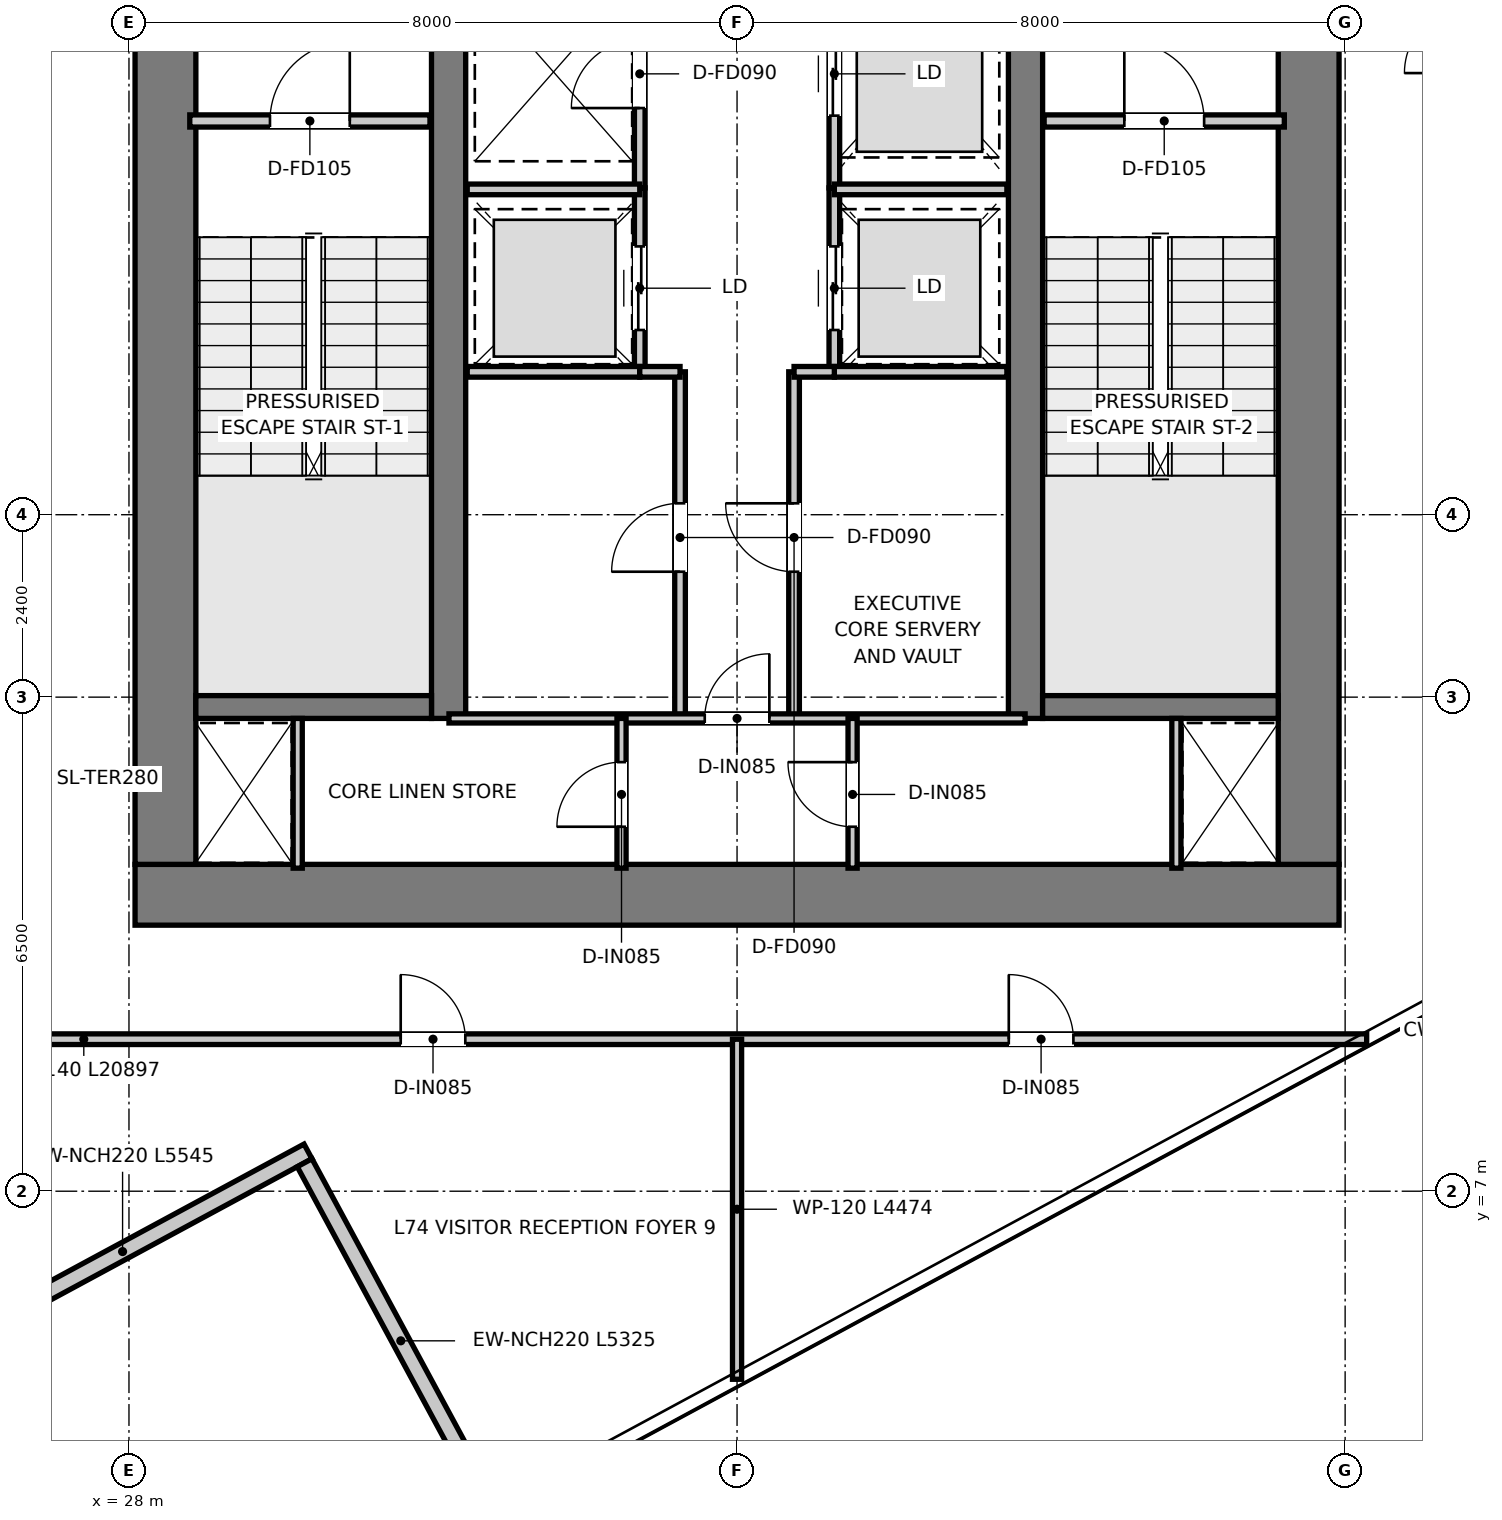
"""IFC4 building model, lengths in metres.
Left out: names, types, materials, properties, quantities, classifications, styles, units other than length and angle.
Written with IfcOpenShell. Run it as: python <this file> out.ifc"""

import sys

from ifc_helpers import new_model, si_unit, direction, frame, frame_2d, origin, place, context, subcontext, project, spatial, rectangle, extrude, element, fill, save


model = new_model("IFC4")
c1 = context("Model", 3, precision=1e-05, world=origin(), true_north=direction((0.0, 1.0)))
c2 = subcontext(c1, "Body", "Model", "MODEL_VIEW")
j1 = project(units=[si_unit("LENGTHUNIT", "METRE"), si_unit("PLANEANGLEUNIT", "RADIAN")], contexts=[c1])
p1 = place(None, origin())
s1 = spatial("IfcSite", under=j1, at=p1, CompositionType="ELEMENT")
p2 = place(p1, origin())
s2 = spatial("IfcBuilding", under=s1, at=p2, CompositionType="ELEMENT")
p3 = place(p2, frame((0.0, 0.0, 302.95)))
s3 = spatial("IfcBuildingStorey", under=s2, at=p3, CompositionType="ELEMENT", Elevation=302.95)
p4 = place(p3, frame((28.08, 10.9, 0.0), z_axis=(0.0, 0.0, 1.0), x_axis=(1.0, 0.0, 0.0)))
e1 = element("IfcWall", 1, at=p4, inside=s3, PredefinedType="SHEAR", context=c2, shape_type="SweptSolid", body=[
    extrude(rectangle(XDim=15.84, YDim=0.8, at=frame_2d((7.92, 0.0))), origin(), (0.0, 0.0, 1.0), 3.95),
])
for number, where, z_axis, x_axis in (
    (2, (28.48, 11.3, 0.0), (0.0, 0.0, 1.0), (0.0, 1.0, 0.0)),
    (3, (43.52, 11.3, 0.0), (0.0, 0.0, 1.0), (0.0, 1.0, 0.0)),
):
    element("IfcWall", number, at=place(p3, frame(where, z_axis=z_axis, x_axis=x_axis)), inside=s3, PredefinedType="SHEAR", context=c2, shape_type="SweptSolid", body=[
        extrude(rectangle(XDim=14.7, YDim=0.8, at=frame_2d((7.35, 0.0))), origin(), (0.0, 0.0, 1.0), 3.95),
    ])
p5 = place(p3, frame((32.205, 13.22, 0.0), z_axis=(0.0, 0.0, 1.0), x_axis=(0.0, 1.0, 0.0)))
e4 = element("IfcWall", 4, at=p5, inside=s3, PredefinedType="SHEAR", context=c2, shape_type="SweptSolid", body=[
    extrude(rectangle(XDim=12.78, YDim=0.45, at=frame_2d((6.39, 0.0))), origin(), (0.0, 0.0, 1.0), 3.95),
])
p6 = place(p5, frame((10.58, 0.0, 0.0)))
e5 = element("IfcOpeningElement", 5, at=p6, cuts=e4, PredefinedType="OPENING", context=c2, shape_type="SweptSolid", body=[
    extrude(rectangle(XDim=1.1, YDim=2.15, at=frame_2d((0.55, 1.075))), frame((0.0, 0.235, 0.0), z_axis=(0.0, -1.0, 0.0), x_axis=(1.0, 0.0, 0.0)), (0.0, 0.0, 1.0), 0.47),
])
p7 = place(p3, frame((39.795, 13.22, 0.0), z_axis=(0.0, 0.0, 1.0), x_axis=(0.0, 1.0, 0.0)))
e6 = element("IfcWall", 6, at=p7, inside=s3, PredefinedType="SHEAR", context=c2, shape_type="SweptSolid", body=[
    extrude(rectangle(XDim=12.78, YDim=0.45, at=frame_2d((6.39, 0.0))), origin(), (0.0, 0.0, 1.0), 3.95),
])
p8 = place(p7, frame((10.58, 0.0, 0.0)))
e7 = element("IfcOpeningElement", 7, at=p8, cuts=e6, PredefinedType="OPENING", context=c2, shape_type="SweptSolid", body=[
    extrude(rectangle(XDim=1.1, YDim=2.15, at=frame_2d((0.55, 1.075))), frame((0.0, 0.235, 0.0), z_axis=(0.0, -1.0, 0.0), x_axis=(1.0, 0.0, 0.0)), (0.0, 0.0, 1.0), 0.47),
])
for number, where, z_axis, x_axis in (
    (8, (28.88, 13.37, 0.0), (0.0, 0.0, 1.0), (1.0, 0.0, 0.0)),
    (9, (40.02, 13.37, 0.0), (0.0, 0.0, 1.0), (1.0, 0.0, 0.0)),
):
    element("IfcWall", number, at=place(p3, frame(where, z_axis=z_axis, x_axis=x_axis)), inside=s3, PredefinedType="SHEAR", context=c2, shape_type="SweptSolid", body=[
        extrude(rectangle(XDim=3.1, YDim=0.3, at=frame_2d((1.55, 0.0))), origin(), (0.0, 0.0, 1.0), 3.95),
    ])
p9 = place(p3, frame((25.477, 4.888, 0.0), z_axis=(0.0, 0.0, 1.0), x_axis=(0.879846852796, 0.475257315172, 0.0)))
e10 = element("IfcWall", 10, at=p9, inside=s3, PredefinedType="ELEMENTEDWALL", context=c2, shape_type="SweptSolid", body=[
    extrude(rectangle(XDim=5.545, YDim=0.22, at=frame_2d((2.772, 0.0))), origin(), (0.0, 0.0, 1.0), 3.67),
])
p10 = place(p3, frame((30.311, 7.375, 0.0), z_axis=(0.0, 0.0, 1.0), x_axis=(0.475250431035, -0.879850571291, 0.0)))
e11 = element("IfcWall", 11, at=p10, inside=s3, PredefinedType="ELEMENTEDWALL", context=c2, shape_type="SweptSolid", body=[
    extrude(rectangle(XDim=5.325, YDim=0.22, at=frame_2d((2.663, 0.0))), origin(), (0.0, 0.0, 1.0), 3.67),
])
p11 = place(p3, frame((28.8, 21.08, 0.0), z_axis=(0.0, 0.0, 1.0), x_axis=(1.0, 0.0, 0.0)))
e12 = element("IfcWall", 12, at=p11, inside=s3, PredefinedType="PARTITIONING", context=c2, shape_type="SweptSolid", body=[
    extrude(rectangle(XDim=3.16, YDim=0.16, at=frame_2d((1.58, 0.0))), origin(), (0.0, 0.0, 1.0), 3.67),
])
p12 = place(p11, frame((1.055, 0.0, 0.0)))
e13 = element("IfcOpeningElement", 13, at=p12, cuts=e12, PredefinedType="OPENING", context=c2, shape_type="SweptSolid", body=[
    extrude(rectangle(XDim=1.05, YDim=2.1, at=frame_2d((0.525, 1.05))), frame((0.0, 0.09, 0.0), z_axis=(0.0, -1.0, 0.0), x_axis=(1.0, 0.0, 0.0)), (0.0, 0.0, 1.0), 0.18),
])
p13 = place(p3, frame((40.04, 21.08, 0.0), z_axis=(0.0, 0.0, 1.0), x_axis=(1.0, 0.0, 0.0)))
e14 = element("IfcWall", 14, at=p13, inside=s3, PredefinedType="PARTITIONING", context=c2, shape_type="SweptSolid", body=[
    extrude(rectangle(XDim=3.16, YDim=0.16, at=frame_2d((1.58, 0.0))), origin(), (0.0, 0.0, 1.0), 3.67),
])
p14 = place(p13, frame((1.055, 0.0, 0.0)))
e15 = element("IfcOpeningElement", 15, at=p14, cuts=e14, PredefinedType="OPENING", context=c2, shape_type="SweptSolid", body=[
    extrude(rectangle(XDim=1.05, YDim=2.1, at=frame_2d((0.525, 1.05))), frame((0.0, 0.09, 0.0), z_axis=(0.0, -1.0, 0.0), x_axis=(1.0, 0.0, 0.0)), (0.0, 0.0, 1.0), 0.18),
])
p15 = place(p3, frame((34.72, 20.2, 0.0), z_axis=(0.0, 0.0, 1.0), x_axis=(0.0, 1.0, 0.0)))
e16 = element("IfcWall", 16, at=p15, inside=s3, PredefinedType="PARTITIONING", context=c2, shape_type="SweptSolid", body=[
    extrude(rectangle(XDim=5.78, YDim=0.14, at=frame_2d((2.89, 0.0))), origin(), (0.0, 0.0, 1.0), 2.82),
])
p16 = place(p15, frame((1.05, 0.0, 0.0)))
e17 = element("IfcOpeningElement", 17, at=p16, cuts=e16, PredefinedType="OPENING", context=c2, shape_type="SweptSolid", body=[
    extrude(rectangle(XDim=0.9, YDim=2.1, at=frame_2d((0.45, 1.05))), frame((0.0, 0.08, 0.0), z_axis=(0.0, -1.0, 0.0), x_axis=(1.0, 0.0, 0.0)), (0.0, 0.0, 1.0), 0.16),
])
p17 = place(p3, frame((37.28, 20.2, 0.0), z_axis=(0.0, 0.0, 1.0), x_axis=(0.0, 1.0, 0.0)))
e18 = element("IfcWall", 18, at=p17, inside=s3, PredefinedType="PARTITIONING", context=c2, shape_type="SweptSolid", body=[
    extrude(rectangle(XDim=5.78, YDim=0.14, at=frame_2d((2.89, 0.0))), origin(), (0.0, 0.0, 1.0), 2.82),
])
p18 = place(p17, frame((0.95, 0.0, 0.0)))
e19 = element("IfcOpeningElement", 19, at=p18, cuts=e18, PredefinedType="OPENING", context=c2, shape_type="SweptSolid", body=[
    extrude(rectangle(XDim=1.1, YDim=2.15, at=frame_2d((0.55, 1.075))), frame((0.0, 0.08, 0.0), z_axis=(0.0, -1.0, 0.0), x_axis=(1.0, 0.0, 0.0)), (0.0, 0.0, 1.0), 0.16),
])
p19 = place(p3, frame((34.72, 17.78, 0.0), z_axis=(0.0, 0.0, 1.0), x_axis=(0.0, 1.0, 0.0)))
e20 = element("IfcWall", 20, at=p19, inside=s3, PredefinedType="PARTITIONING", context=c2, shape_type="SweptSolid", body=[
    extrude(rectangle(XDim=2.42, YDim=0.14, at=frame_2d((1.21, 0.0))), origin(), (0.0, 0.0, 1.0), 3.67),
])
p20 = place(p19, frame((0.55, 0.0, 0.0)))
e21 = element("IfcOpeningElement", 21, at=p20, cuts=e20, PredefinedType="OPENING", context=c2, shape_type="SweptSolid", body=[
    extrude(rectangle(XDim=1.1, YDim=2.15, at=frame_2d((0.55, 1.075))), frame((0.0, 0.08, 0.0), z_axis=(0.0, -1.0, 0.0), x_axis=(1.0, 0.0, 0.0)), (0.0, 0.0, 1.0), 0.16),
])
p21 = place(p3, frame((37.28, 17.78, 0.0), z_axis=(0.0, 0.0, 1.0), x_axis=(0.0, 1.0, 0.0)))
e22 = element("IfcWall", 22, at=p21, inside=s3, PredefinedType="PARTITIONING", context=c2, shape_type="SweptSolid", body=[
    extrude(rectangle(XDim=2.42, YDim=0.14, at=frame_2d((1.21, 0.0))), origin(), (0.0, 0.0, 1.0), 3.67),
])
p22 = place(p21, frame((0.55, 0.0, 0.0)))
e23 = element("IfcOpeningElement", 23, at=p22, cuts=e22, PredefinedType="OPENING", context=c2, shape_type="SweptSolid", body=[
    extrude(rectangle(XDim=1.1, YDim=2.15, at=frame_2d((0.55, 1.075))), frame((0.0, 0.08, 0.0), z_axis=(0.0, -1.0, 0.0), x_axis=(1.0, 0.0, 0.0)), (0.0, 0.0, 1.0), 0.16),
])
for number, where, z_axis, x_axis in (
    (24, (32.45, 17.78, 0.0), (0.0, 0.0, 1.0), (1.0, 0.0, 0.0)),
    (25, (32.45, 20.18, 0.0), (0.0, 0.0, 1.0), (1.0, 0.0, 0.0)),
    (26, (37.28, 17.78, 0.0), (0.0, 0.0, 1.0), (1.0, 0.0, 0.0)),
    (27, (37.28, 20.18, 0.0), (0.0, 0.0, 1.0), (1.0, 0.0, 0.0)),
):
    element("IfcWall", number, at=place(p3, frame(where, z_axis=z_axis, x_axis=x_axis)), inside=s3, PredefinedType="PARTITIONING", context=c2, shape_type="SweptSolid", body=[
        extrude(rectangle(XDim=2.27, YDim=0.14, at=frame_2d((1.135, 0.0))), origin(), (0.0, 0.0, 1.0), 3.67),
    ])
p23 = place(p3, frame((35.25, 13.22, 0.0), z_axis=(0.0, 0.0, 1.0), x_axis=(0.0, 1.0, 0.0)))
e28 = element("IfcWall", 28, at=p23, inside=s3, PredefinedType="PARTITIONING", context=c2, shape_type="SweptSolid", body=[
    extrude(rectangle(XDim=4.56, YDim=0.14, at=frame_2d((2.28, 0.0))), origin(), (0.0, 0.0, 1.0), 3.67),
])
p24 = place(p23, frame((1.93, 0.0, 0.0)))
e29 = element("IfcOpeningElement", 29, at=p24, cuts=e28, PredefinedType="OPENING", context=c2, shape_type="SweptSolid", body=[
    extrude(rectangle(XDim=0.9, YDim=2.1, at=frame_2d((0.45, 1.05))), frame((0.0, 0.08, 0.0), z_axis=(0.0, -1.0, 0.0), x_axis=(1.0, 0.0, 0.0)), (0.0, 0.0, 1.0), 0.16),
])
p25 = place(p3, frame((34.72, 17.78, 0.0), z_axis=(0.0, 0.0, 1.0), x_axis=(1.0, 0.0, 0.0)))
e30 = element("IfcWall", 30, at=p25, inside=s3, PredefinedType="PARTITIONING", context=c2, shape_type="SweptSolid", body=[
    extrude(rectangle(XDim=0.53, YDim=0.14, at=frame_2d((0.265, 0.0))), origin(), (0.0, 0.0, 1.0), 3.67),
])
p26 = place(p3, frame((36.75, 13.22, 0.0), z_axis=(0.0, 0.0, 1.0), x_axis=(0.0, 1.0, 0.0)))
e31 = element("IfcWall", 31, at=p26, inside=s3, PredefinedType="PARTITIONING", context=c2, shape_type="SweptSolid", body=[
    extrude(rectangle(XDim=4.56, YDim=0.14, at=frame_2d((2.28, 0.0))), origin(), (0.0, 0.0, 1.0), 3.67),
])
p27 = place(p26, frame((1.93, 0.0, 0.0)))
e32 = element("IfcOpeningElement", 32, at=p27, cuts=e31, PredefinedType="OPENING", context=c2, shape_type="SweptSolid", body=[
    extrude(rectangle(XDim=0.9, YDim=2.1, at=frame_2d((0.45, 1.05))), frame((0.0, 0.08, 0.0), z_axis=(0.0, -1.0, 0.0), x_axis=(1.0, 0.0, 0.0)), (0.0, 0.0, 1.0), 0.16),
])
p28 = place(p3, frame((36.75, 17.78, 0.0), z_axis=(0.0, 0.0, 1.0), x_axis=(1.0, 0.0, 0.0)))
e33 = element("IfcWall", 33, at=p28, inside=s3, PredefinedType="PARTITIONING", context=c2, shape_type="SweptSolid", body=[
    extrude(rectangle(XDim=0.53, YDim=0.14, at=frame_2d((0.265, 0.0))), origin(), (0.0, 0.0, 1.0), 3.67),
])
for number, where, z_axis, x_axis in (
    (34, (30.22, 11.25, 0.0), (0.0, 0.0, 1.0), (0.0, 1.0, 0.0)),
    (35, (41.78, 11.25, 0.0), (0.0, 0.0, 1.0), (0.0, 1.0, 0.0)),
):
    element("IfcWall", number, at=place(p3, frame(where, z_axis=z_axis, x_axis=x_axis)), inside=s3, PredefinedType="PARTITIONING", context=c2, shape_type="SweptSolid", body=[
        extrude(rectangle(XDim=1.97, YDim=0.12, at=frame_2d((0.985, 0.0))), origin(), (0.0, 0.0, 1.0), 3.67),
    ])
p29 = place(p3, frame((32.21, 13.22, 0.0), z_axis=(0.0, 0.0, 1.0), x_axis=(1.0, 0.0, 0.0)))
e36 = element("IfcWall", 36, at=p29, inside=s3, PredefinedType="PARTITIONING", context=c2, shape_type="SweptSolid", body=[
    extrude(rectangle(XDim=7.58, YDim=0.12, at=frame_2d((3.79, 0.0))), origin(), (0.0, 0.0, 1.0), 3.67),
])
p30 = place(p29, frame((3.365, 0.0, 0.0)))
e37 = element("IfcOpeningElement", 37, at=p30, cuts=e36, PredefinedType="OPENING", context=c2, shape_type="SweptSolid", body=[
    extrude(rectangle(XDim=0.85, YDim=2.1, at=frame_2d((0.425, 1.05))), frame((0.0, 0.07, 0.0), z_axis=(0.0, -1.0, 0.0), x_axis=(1.0, 0.0, 0.0)), (0.0, 0.0, 1.0), 0.14),
])
p31 = place(p3, frame((34.48, 11.25, 0.0), z_axis=(0.0, 0.0, 1.0), x_axis=(0.0, 1.0, 0.0)))
e38 = element("IfcWall", 38, at=p31, inside=s3, PredefinedType="PARTITIONING", context=c2, shape_type="SweptSolid", body=[
    extrude(rectangle(XDim=1.97, YDim=0.12, at=frame_2d((0.985, 0.0))), origin(), (0.0, 0.0, 1.0), 3.67),
])
p32 = place(p31, frame((0.545, 0.0, 0.0)))
e39 = element("IfcOpeningElement", 39, at=p32, cuts=e38, PredefinedType="OPENING", context=c2, shape_type="SweptSolid", body=[
    extrude(rectangle(XDim=0.85, YDim=2.1, at=frame_2d((0.425, 1.05))), frame((0.0, 0.07, 0.0), z_axis=(0.0, -1.0, 0.0), x_axis=(1.0, 0.0, 0.0)), (0.0, 0.0, 1.0), 0.14),
])
p33 = place(p3, frame((37.52, 11.25, 0.0), z_axis=(0.0, 0.0, 1.0), x_axis=(0.0, 1.0, 0.0)))
e40 = element("IfcWall", 40, at=p33, inside=s3, PredefinedType="PARTITIONING", context=c2, shape_type="SweptSolid", body=[
    extrude(rectangle(XDim=1.97, YDim=0.12, at=frame_2d((0.985, 0.0))), origin(), (0.0, 0.0, 1.0), 3.67),
])
p34 = place(p33, frame((0.545, 0.0, 0.0)))
e41 = element("IfcOpeningElement", 41, at=p34, cuts=e40, PredefinedType="OPENING", context=c2, shape_type="SweptSolid", body=[
    extrude(rectangle(XDim=0.85, YDim=2.1, at=frame_2d((0.425, 1.05))), frame((0.0, 0.07, 0.0), z_axis=(0.0, -1.0, 0.0), x_axis=(1.0, 0.0, 0.0)), (0.0, 0.0, 1.0), 0.14),
])
p35 = place(p3, frame((23.386, 9.0, 0.0), z_axis=(0.0, 0.0, 1.0), x_axis=(1.0, 0.0, 0.0)))
e42 = element("IfcWall", 42, at=p35, inside=s3, PredefinedType="PARTITIONING", context=c2, shape_type="SweptSolid", body=[
    extrude(rectangle(XDim=20.897, YDim=0.14, at=frame_2d((10.448, 0.0))), origin(), (0.0, 0.0, 1.0), 3.67),
])
p36 = place(p35, frame((8.189, 0.0, 0.0)))
e43 = element("IfcOpeningElement", 43, at=p36, cuts=e42, PredefinedType="OPENING", context=c2, shape_type="SweptSolid", body=[
    extrude(rectangle(XDim=0.85, YDim=2.1, at=frame_2d((0.425, 1.05))), frame((0.0, 0.08, 0.0), z_axis=(0.0, -1.0, 0.0), x_axis=(1.0, 0.0, 0.0)), (0.0, 0.0, 1.0), 0.16),
])
p37 = place(p35, frame((16.189, 0.0, 0.0)))
e44 = element("IfcOpeningElement", 44, at=p37, cuts=e42, PredefinedType="OPENING", context=c2, shape_type="SweptSolid", body=[
    extrude(rectangle(XDim=0.85, YDim=2.1, at=frame_2d((0.425, 1.05))), frame((0.0, 0.08, 0.0), z_axis=(0.0, -1.0, 0.0), x_axis=(1.0, 0.0, 0.0)), (0.0, 0.0, 1.0), 0.16),
])
p38 = place(p3, frame((36.0, 4.526, 0.0), z_axis=(0.0, 0.0, 1.0), x_axis=(0.0, 1.0, 0.0)))
e45 = element("IfcWall", 45, at=p38, inside=s3, PredefinedType="PARTITIONING", context=c2, shape_type="SweptSolid", body=[
    extrude(rectangle(XDim=4.474, YDim=0.12, at=frame_2d((2.237, 0.0))), origin(), (0.0, 0.0, 1.0), 3.67),
])
p39 = place(p12, origin())
e46 = element("IfcDoor", 46, at=p39, inside=s3, OperationType="SINGLE_SWING_RIGHT", PredefinedType="DOOR", context=c2, shape_type="SweptSolid", body=[
    extrude(rectangle(XDim=1.05, YDim=2.1, at=frame_2d((0.525, 1.05))), frame((0.0, 0.025, 0.0), z_axis=(0.0, -1.0, 0.0), x_axis=(1.0, 0.0, 0.0)), (0.0, 0.0, 1.0), 0.05),
])
fill(e13, e46)
p40 = place(p14, origin())
e47 = element("IfcDoor", 47, at=p40, inside=s3, OperationType="SINGLE_SWING_LEFT", PredefinedType="DOOR", context=c2, shape_type="SweptSolid", body=[
    extrude(rectangle(XDim=1.05, YDim=2.1, at=frame_2d((0.525, 1.05))), frame((0.0, 0.025, 0.0), z_axis=(0.0, -1.0, 0.0), x_axis=(1.0, 0.0, 0.0)), (0.0, 0.0, 1.0), 0.05),
])
fill(e15, e47)
p41 = place(p16, origin())
e48 = element("IfcDoor", 48, at=p41, inside=s3, OperationType="SINGLE_SWING_LEFT", PredefinedType="DOOR", context=c2, shape_type="SweptSolid", body=[
    extrude(rectangle(XDim=0.9, YDim=2.1, at=frame_2d((0.45, 1.05))), frame((0.0, 0.025, 0.0), z_axis=(0.0, -1.0, 0.0), x_axis=(1.0, 0.0, 0.0)), (0.0, 0.0, 1.0), 0.05),
])
fill(e17, e48)
p42 = place(p18, origin())
e49 = element("IfcDoor", 49, at=p42, inside=s3, OperationType="DOUBLE_DOOR_SLIDING", PredefinedType="DOOR", context=c2, shape_type="SweptSolid", body=[
    extrude(rectangle(XDim=1.1, YDim=2.15, at=frame_2d((0.55, 1.075))), frame((0.0, 0.025, 0.0), z_axis=(0.0, -1.0, 0.0), x_axis=(1.0, 0.0, 0.0)), (0.0, 0.0, 1.0), 0.05),
])
fill(e19, e49)
p43 = place(p20, origin())
e50 = element("IfcDoor", 50, at=p43, inside=s3, OperationType="DOUBLE_DOOR_SLIDING", PredefinedType="DOOR", context=c2, shape_type="SweptSolid", body=[
    extrude(rectangle(XDim=1.1, YDim=2.15, at=frame_2d((0.55, 1.075))), frame((0.0, 0.025, 0.0), z_axis=(0.0, -1.0, 0.0), x_axis=(1.0, 0.0, 0.0)), (0.0, 0.0, 1.0), 0.05),
])
fill(e21, e50)
p44 = place(p22, origin())
e51 = element("IfcDoor", 51, at=p44, inside=s3, OperationType="DOUBLE_DOOR_SLIDING", PredefinedType="DOOR", context=c2, shape_type="SweptSolid", body=[
    extrude(rectangle(XDim=1.1, YDim=2.15, at=frame_2d((0.55, 1.075))), frame((0.0, 0.025, 0.0), z_axis=(0.0, -1.0, 0.0), x_axis=(1.0, 0.0, 0.0)), (0.0, 0.0, 1.0), 0.05),
])
fill(e23, e51)
p45 = place(p24, origin())
e52 = element("IfcDoor", 52, at=p45, inside=s3, OperationType="SINGLE_SWING_LEFT", PredefinedType="DOOR", context=c2, shape_type="SweptSolid", body=[
    extrude(rectangle(XDim=0.9, YDim=2.1, at=frame_2d((0.45, 1.05))), frame((0.0, 0.025, 0.0), z_axis=(0.0, -1.0, 0.0), x_axis=(1.0, 0.0, 0.0)), (0.0, 0.0, 1.0), 0.05),
])
fill(e29, e52)
p46 = place(p27, origin())
e53 = element("IfcDoor", 53, at=p46, inside=s3, OperationType="SINGLE_SWING_RIGHT", PredefinedType="DOOR", context=c2, shape_type="SweptSolid", body=[
    extrude(rectangle(XDim=0.9, YDim=2.1, at=frame_2d((0.45, 1.05))), frame((0.0, 0.025, 0.0), z_axis=(0.0, -1.0, 0.0), x_axis=(1.0, 0.0, 0.0)), (0.0, 0.0, 1.0), 0.05),
])
fill(e32, e53)
p47 = place(p30, origin())
e54 = element("IfcDoor", 54, at=p47, inside=s3, OperationType="SINGLE_SWING_RIGHT", PredefinedType="DOOR", context=c2, shape_type="SweptSolid", body=[
    extrude(rectangle(XDim=0.85, YDim=2.1, at=frame_2d((0.425, 1.05))), frame((0.0, 0.025, 0.0), z_axis=(0.0, -1.0, 0.0), x_axis=(1.0, 0.0, 0.0)), (0.0, 0.0, 1.0), 0.05),
])
fill(e37, e54)
p48 = place(p32, origin())
e55 = element("IfcDoor", 55, at=p48, inside=s3, OperationType="SINGLE_SWING_LEFT", PredefinedType="DOOR", context=c2, shape_type="SweptSolid", body=[
    extrude(rectangle(XDim=0.85, YDim=2.1, at=frame_2d((0.425, 1.05))), frame((0.0, 0.025, 0.0), z_axis=(0.0, -1.0, 0.0), x_axis=(1.0, 0.0, 0.0)), (0.0, 0.0, 1.0), 0.05),
])
fill(e39, e55)
p49 = place(p34, origin())
e56 = element("IfcDoor", 56, at=p49, inside=s3, OperationType="SINGLE_SWING_RIGHT", PredefinedType="DOOR", context=c2, shape_type="SweptSolid", body=[
    extrude(rectangle(XDim=0.85, YDim=2.1, at=frame_2d((0.425, 1.05))), frame((0.0, 0.025, 0.0), z_axis=(0.0, -1.0, 0.0), x_axis=(1.0, 0.0, 0.0)), (0.0, 0.0, 1.0), 0.05),
])
fill(e41, e56)
p50 = place(p36, origin())
e57 = element("IfcDoor", 57, at=p50, inside=s3, OperationType="SINGLE_SWING_LEFT", PredefinedType="DOOR", context=c2, shape_type="SweptSolid", body=[
    extrude(rectangle(XDim=0.85, YDim=2.1, at=frame_2d((0.425, 1.05))), frame((0.0, 0.025, 0.0), z_axis=(0.0, -1.0, 0.0), x_axis=(1.0, 0.0, 0.0)), (0.0, 0.0, 1.0), 0.05),
])
fill(e43, e57)
p51 = place(p37, origin())
e58 = element("IfcDoor", 58, at=p51, inside=s3, OperationType="SINGLE_SWING_LEFT", PredefinedType="DOOR", context=c2, shape_type="SweptSolid", body=[
    extrude(rectangle(XDim=0.85, YDim=2.1, at=frame_2d((0.425, 1.05))), frame((0.0, 0.025, 0.0), z_axis=(0.0, -1.0, 0.0), x_axis=(1.0, 0.0, 0.0)), (0.0, 0.0, 1.0), 0.05),
])
fill(e44, e58)
save(model, sys.argv[1])
